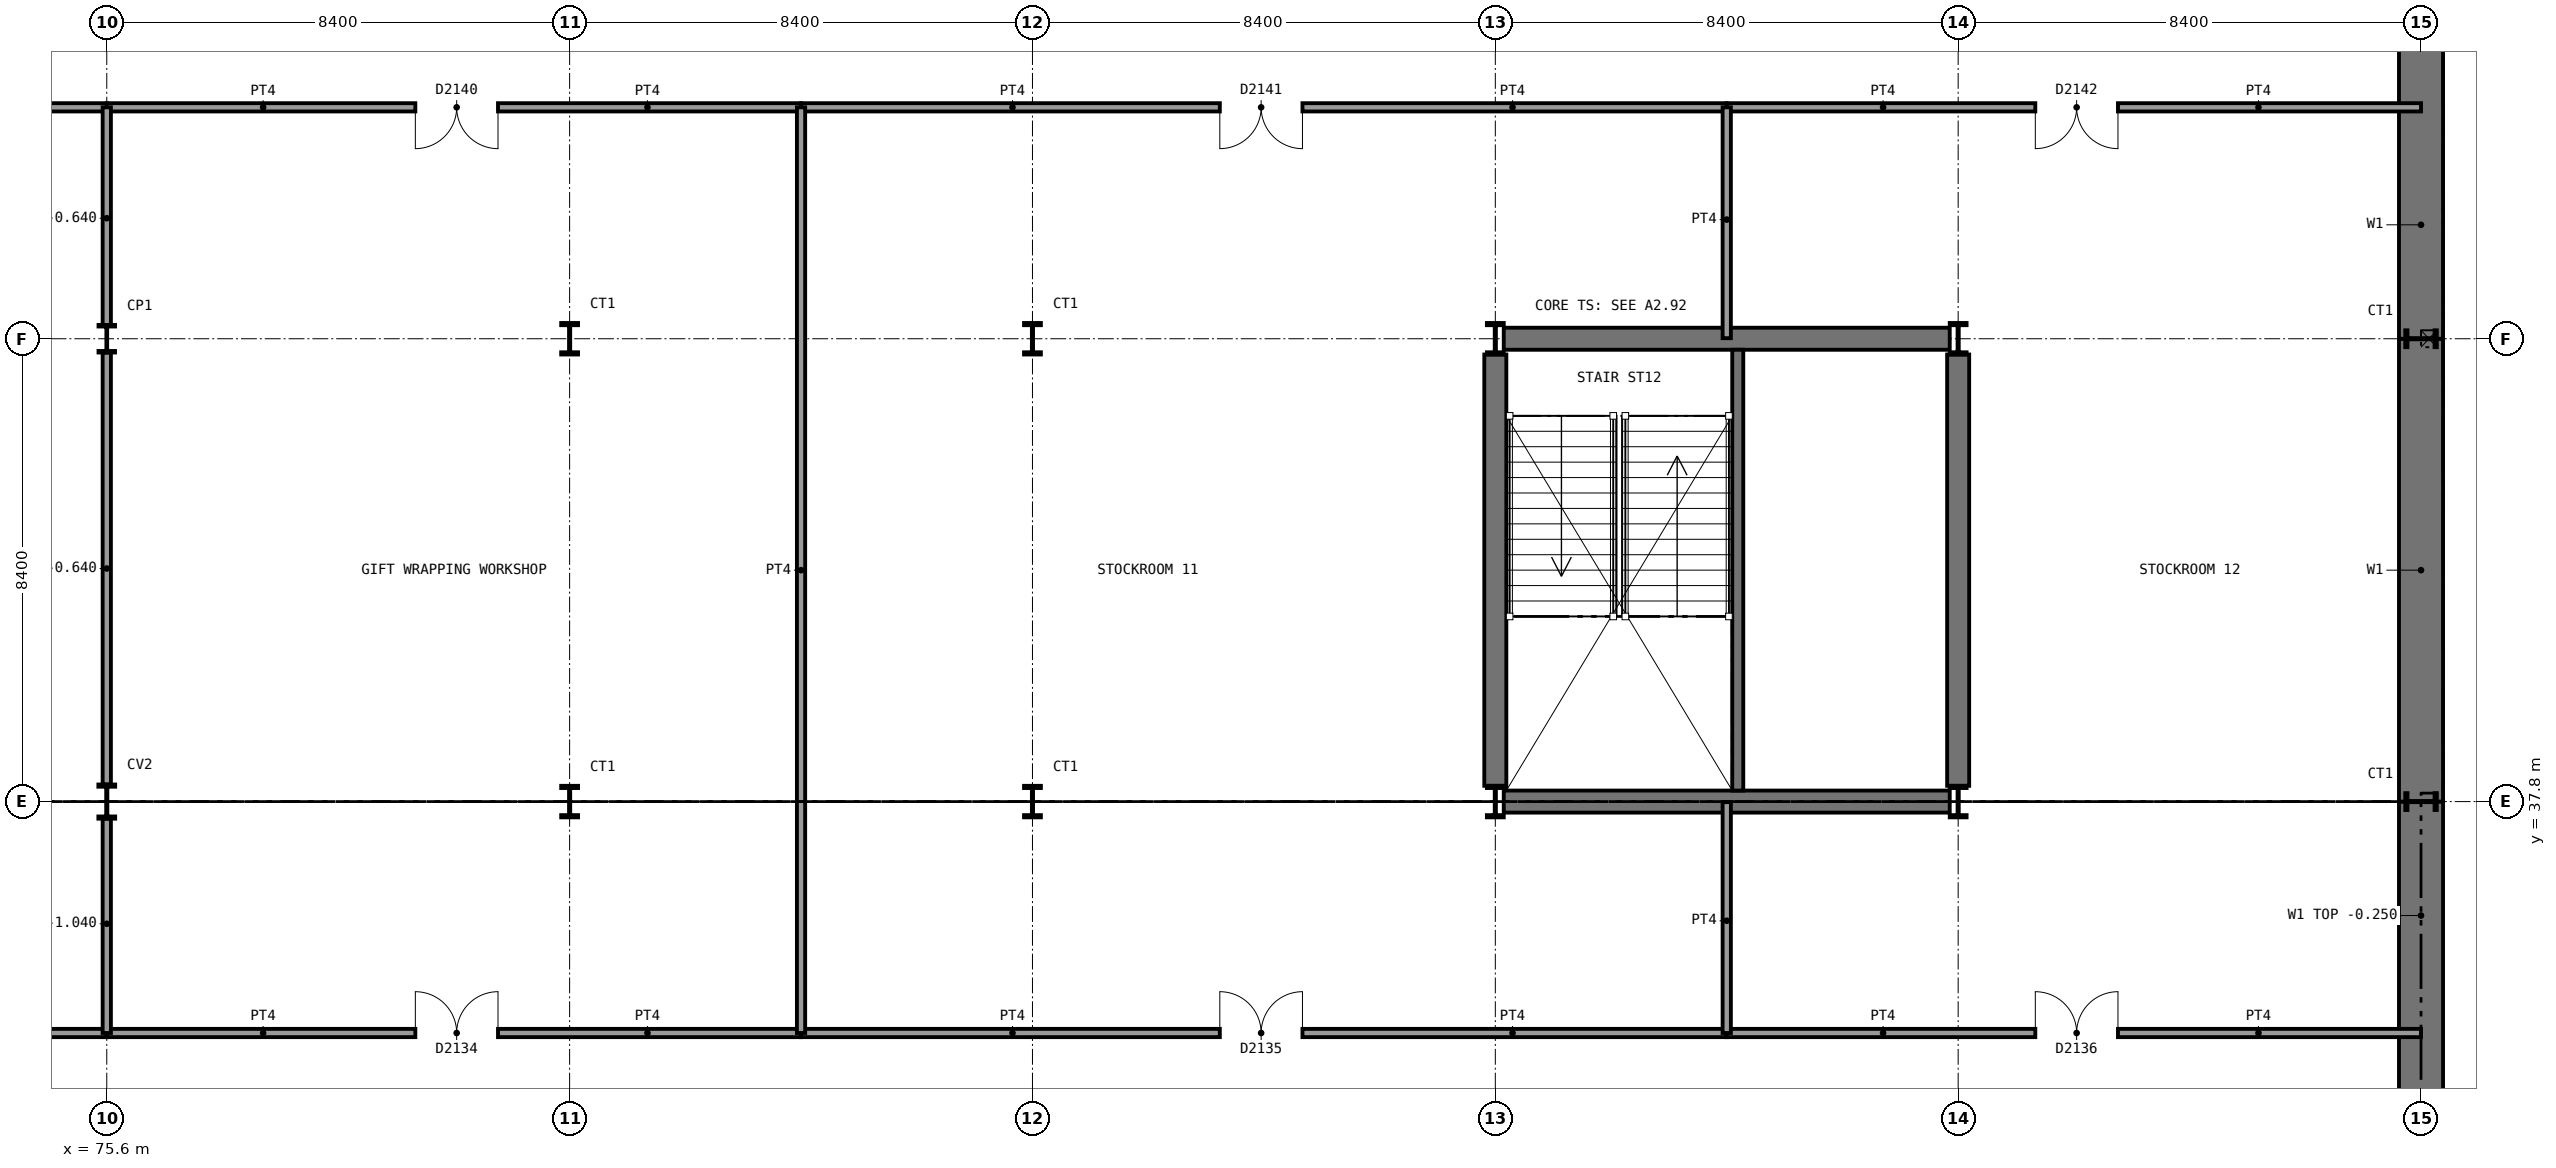
"""IFC4 building model, lengths in metres.
Left out: names, types, materials, properties, quantities, classifications, styles, units other than length and angle.
Written with IfcOpenShell. Run it as: python <this file> out.ifc"""

import sys

from ifc_helpers import new_model, si_unit, direction, frame, frame_2d, origin, origin_2d, place, context, subcontext, project, spatial, rectangle, i_section, extrude, element, fill, save


model = new_model("IFC4")
c1 = context("Model", 3, precision=1e-05, world=origin(), true_north=direction((0.0, 1.0)))
c2 = subcontext(c1, "Body", "Model", "MODEL_VIEW")
j1 = project(units=[si_unit("LENGTHUNIT", "METRE"), si_unit("PLANEANGLEUNIT", "RADIAN")], contexts=[c1])
p1 = place(None, origin())
s1 = spatial("IfcSite", under=j1, at=p1, CompositionType="ELEMENT")
p2 = place(p1, origin())
s2 = spatial("IfcBuilding", under=s1, at=p2, CompositionType="ELEMENT")
p3 = place(p2, frame((0.0, 0.0, -4.9)))
s3 = spatial("IfcBuildingStorey", under=s2, at=p3, CompositionType="ELEMENT", Elevation=-4.9)
p4 = place(p3, frame((117.6, 25.2, 0.0), z_axis=(0.0, 0.0, 1.0), x_axis=(0.0, 1.0, 0.0)))
e1 = element("IfcWall", 1, at=p4, inside=s3, PredefinedType="SOLIDWALL", context=c2, shape_type="SweptSolid", body=[
    extrude(rectangle(XDim=12.6, YDim=0.8, at=frame_2d((6.3, 0.0))), origin(), (0.0, 0.0, 1.0), 4.65),
])
p5 = place(p3, frame((117.6, 37.8, 0.0), z_axis=(0.0, 0.0, 1.0), x_axis=(0.0, 1.0, 0.0)))
e2 = element("IfcWall", 2, at=p5, inside=s3, PredefinedType="SOLIDWALL", context=c2, shape_type="SweptSolid", body=[
    extrude(rectangle(XDim=8.4, YDim=0.8, at=frame_2d((4.2, 0.0))), origin(), (0.0, 0.0, 1.0), 4.75),
])
p6 = place(p3, frame((117.6, 46.2, 0.0), z_axis=(0.0, 0.0, 1.0), x_axis=(0.0, 1.0, 0.0)))
e3 = element("IfcWall", 3, at=p6, inside=s3, PredefinedType="SOLIDWALL", context=c2, shape_type="SweptSolid", body=[
    extrude(rectangle(XDim=8.247, YDim=0.8, at=frame_2d((4.124, 0.0))), origin(), (0.0, 0.0, 1.0), 4.75),
])
for number, where, z_axis, x_axis in (
    (4, (100.953, 37.8, 0.0), (0.0, 0.0, 1.0), (1.0, 0.0, 0.0)),
    (5, (100.953, 46.2, 0.0), (0.0, 0.0, 1.0), (1.0, 0.0, 0.0)),
):
    element("IfcWall", number, at=place(p3, frame(where, z_axis=z_axis, x_axis=x_axis)), inside=s3, PredefinedType="SHEAR", context=c2, shape_type="SweptSolid", body=[
        extrude(rectangle(XDim=8.094, YDim=0.4, at=frame_2d((4.047, 0.0))), origin(), (0.0, 0.0, 1.0), 4.75),
    ])
for number, where, z_axis, x_axis in (
    (6, (100.8, 38.086, 0.0), (0.0, 0.0, 1.0), (0.0, 1.0, 0.0)),
    (7, (109.2, 38.086, 0.0), (0.0, 0.0, 1.0), (0.0, 1.0, 0.0)),
):
    element("IfcWall", number, at=place(p3, frame(where, z_axis=z_axis, x_axis=x_axis)), inside=s3, PredefinedType="SHEAR", context=c2, shape_type="SweptSolid", body=[
        extrude(rectangle(XDim=7.828, YDim=0.4, at=frame_2d((3.914, 0.0))), origin(), (0.0, 0.0, 1.0), 4.75),
    ])
p7 = place(p3, frame((75.6, 37.8, 0.0), z_axis=(0.0, 0.0, 1.0), x_axis=(1.0, 0.0, 0.0)))
e8 = element("IfcColumn", 8, at=p7, inside=s3, PredefinedType="COLUMN", context=c2, shape_type="SweptSolid", body=[
    extrude(i_section(OverallWidth=0.305, OverallDepth=0.62, WebThickness=0.021, FlangeThickness=0.04, FilletRadius=0.027, at=origin_2d()), origin(), (0.0, 0.0, 1.0), 4.9),
])
p8 = place(p3, frame((75.6, 46.2, 0.0), z_axis=(0.0, 0.0, 1.0), x_axis=(1.0, 0.0, 0.0)))
e9 = element("IfcColumn", 9, at=p8, inside=s3, PredefinedType="COLUMN", context=c2, shape_type="SweptSolid", body=[
    extrude(i_section(OverallWidth=0.3, OverallDepth=0.5, WebThickness=0.014, FlangeThickness=0.028, FilletRadius=0.027, at=origin_2d()), origin(), (0.0, 0.0, 1.0), 4.9),
])
for number, where, z_axis, x_axis in (
    (10, (84.0, 37.8, 0.0), (0.0, 0.0, 1.0), (1.0, 0.0, 0.0)),
    (11, (84.0, 46.2, 0.0), (0.0, 0.0, 1.0), (1.0, 0.0, 0.0)),
    (12, (92.4, 37.8, 0.0), (0.0, 0.0, 1.0), (1.0, 0.0, 0.0)),
    (13, (92.4, 46.2, 0.0), (0.0, 0.0, 1.0), (1.0, 0.0, 0.0)),
    (14, (100.8, 37.8, 0.0), (0.0, 0.0, 1.0), (1.0, 0.0, 0.0)),
    (15, (100.8, 46.2, 0.0), (0.0, 0.0, 1.0), (1.0, 0.0, 0.0)),
    (16, (109.2, 37.8, 0.0), (0.0, 0.0, 1.0), (1.0, 0.0, 0.0)),
    (17, (109.2, 46.2, 0.0), (0.0, 0.0, 1.0), (1.0, 0.0, 0.0)),
    (18, (117.6, 37.8, 0.0), (0.0, 0.0, 1.0), (0.0, 1.0, 0.0)),
    (19, (117.6, 46.2, 0.0), (0.0, 0.0, 1.0), (0.0, 1.0, 0.0)),
):
    element("IfcColumn", number, at=place(p3, frame(where, z_axis=z_axis, x_axis=x_axis)), inside=s3, PredefinedType="COLUMN", context=c2, shape_type="SweptSolid", body=[
        extrude(i_section(OverallWidth=0.306, OverallDepth=0.572, WebThickness=0.021, FlangeThickness=0.04, FilletRadius=0.027, at=origin_2d()), origin(), (0.0, 0.0, 1.0), 4.9),
    ])
p9 = place(p3, frame((58.8, 33.6, 0.0), z_axis=(0.0, 0.0, 1.0), x_axis=(1.0, 0.0, 0.0)))
e20 = element("IfcWall", 20, at=p9, inside=s3, PredefinedType="SOLIDWALL", context=c2, shape_type="SweptSolid", body=[
    extrude(rectangle(XDim=16.8, YDim=0.15, at=frame_2d((8.4, 0.0))), origin(), (0.0, 0.0, 1.0), 4.65),
])
p10 = place(p9, frame((7.6, 0.0, 0.0)))
e21 = element("IfcOpeningElement", 21, at=p10, cuts=e20, PredefinedType="OPENING", context=c2, shape_type="SweptSolid", body=[
    extrude(rectangle(XDim=1.5, YDim=2.1, at=frame_2d((0.75, 1.05))), frame((0.0, 0.085, 0.0), z_axis=(0.0, -1.0, 0.0), x_axis=(1.0, 0.0, 0.0)), (0.0, 0.0, 1.0), 0.17),
])
p11 = place(p3, frame((75.6, 33.6, 0.0), z_axis=(0.0, 0.0, 1.0), x_axis=(1.0, 0.0, 0.0)))
e22 = element("IfcWall", 22, at=p11, inside=s3, PredefinedType="SOLIDWALL", context=c2, shape_type="SweptSolid", body=[
    extrude(rectangle(XDim=12.6, YDim=0.15, at=frame_2d((6.3, 0.0))), origin(), (0.0, 0.0, 1.0), 4.65),
])
p12 = place(p11, frame((5.6, 0.0, 0.0)))
e23 = element("IfcOpeningElement", 23, at=p12, cuts=e22, PredefinedType="OPENING", context=c2, shape_type="SweptSolid", body=[
    extrude(rectangle(XDim=1.5, YDim=2.1, at=frame_2d((0.75, 1.05))), frame((0.0, 0.085, 0.0), z_axis=(0.0, -1.0, 0.0), x_axis=(1.0, 0.0, 0.0)), (0.0, 0.0, 1.0), 0.17),
])
p13 = place(p3, frame((88.2, 33.6, 0.0), z_axis=(0.0, 0.0, 1.0), x_axis=(1.0, 0.0, 0.0)))
e24 = element("IfcWall", 24, at=p13, inside=s3, PredefinedType="SOLIDWALL", context=c2, shape_type="SweptSolid", body=[
    extrude(rectangle(XDim=16.8, YDim=0.15, at=frame_2d((8.4, 0.0))), origin(), (0.0, 0.0, 1.0), 4.65),
])
p14 = place(p13, frame((7.6, 0.0, 0.0)))
e25 = element("IfcOpeningElement", 25, at=p14, cuts=e24, PredefinedType="OPENING", context=c2, shape_type="SweptSolid", body=[
    extrude(rectangle(XDim=1.5, YDim=2.1, at=frame_2d((0.75, 1.05))), frame((0.0, 0.085, 0.0), z_axis=(0.0, -1.0, 0.0), x_axis=(1.0, 0.0, 0.0)), (0.0, 0.0, 1.0), 0.17),
])
p15 = place(p3, frame((105.0, 33.6, 0.0), z_axis=(0.0, 0.0, 1.0), x_axis=(1.0, 0.0, 0.0)))
e26 = element("IfcWall", 26, at=p15, inside=s3, PredefinedType="SOLIDWALL", context=c2, shape_type="SweptSolid", body=[
    extrude(rectangle(XDim=12.6, YDim=0.15, at=frame_2d((6.3, 0.0))), origin(), (0.0, 0.0, 1.0), 4.65),
])
p16 = place(p15, frame((5.6, 0.0, 0.0)))
e27 = element("IfcOpeningElement", 27, at=p16, cuts=e26, PredefinedType="OPENING", context=c2, shape_type="SweptSolid", body=[
    extrude(rectangle(XDim=1.5, YDim=2.1, at=frame_2d((0.75, 1.05))), frame((0.0, 0.085, 0.0), z_axis=(0.0, -1.0, 0.0), x_axis=(1.0, 0.0, 0.0)), (0.0, 0.0, 1.0), 0.17),
])
p17 = place(p3, frame((58.8, 50.4, 0.0), z_axis=(0.0, 0.0, 1.0), x_axis=(1.0, 0.0, 0.0)))
e28 = element("IfcWall", 28, at=p17, inside=s3, PredefinedType="SOLIDWALL", context=c2, shape_type="SweptSolid", body=[
    extrude(rectangle(XDim=16.8, YDim=0.15, at=frame_2d((8.4, 0.0))), origin(), (0.0, 0.0, 1.0), 4.65),
])
p18 = place(p17, frame((7.6, 0.0, 0.0)))
e29 = element("IfcOpeningElement", 29, at=p18, cuts=e28, PredefinedType="OPENING", context=c2, shape_type="SweptSolid", body=[
    extrude(rectangle(XDim=1.5, YDim=2.1, at=frame_2d((0.75, 1.05))), frame((0.0, 0.085, 0.0), z_axis=(0.0, -1.0, 0.0), x_axis=(1.0, 0.0, 0.0)), (0.0, 0.0, 1.0), 0.17),
])
p19 = place(p3, frame((75.6, 50.4, 0.0), z_axis=(0.0, 0.0, 1.0), x_axis=(1.0, 0.0, 0.0)))
e30 = element("IfcWall", 30, at=p19, inside=s3, PredefinedType="SOLIDWALL", context=c2, shape_type="SweptSolid", body=[
    extrude(rectangle(XDim=12.6, YDim=0.15, at=frame_2d((6.3, 0.0))), origin(), (0.0, 0.0, 1.0), 4.65),
])
p20 = place(p19, frame((5.6, 0.0, 0.0)))
e31 = element("IfcOpeningElement", 31, at=p20, cuts=e30, PredefinedType="OPENING", context=c2, shape_type="SweptSolid", body=[
    extrude(rectangle(XDim=1.5, YDim=2.1, at=frame_2d((0.75, 1.05))), frame((0.0, 0.085, 0.0), z_axis=(0.0, -1.0, 0.0), x_axis=(1.0, 0.0, 0.0)), (0.0, 0.0, 1.0), 0.17),
])
p21 = place(p3, frame((88.2, 50.4, 0.0), z_axis=(0.0, 0.0, 1.0), x_axis=(1.0, 0.0, 0.0)))
e32 = element("IfcWall", 32, at=p21, inside=s3, PredefinedType="SOLIDWALL", context=c2, shape_type="SweptSolid", body=[
    extrude(rectangle(XDim=16.8, YDim=0.15, at=frame_2d((8.4, 0.0))), origin(), (0.0, 0.0, 1.0), 4.65),
])
p22 = place(p21, frame((7.6, 0.0, 0.0)))
e33 = element("IfcOpeningElement", 33, at=p22, cuts=e32, PredefinedType="OPENING", context=c2, shape_type="SweptSolid", body=[
    extrude(rectangle(XDim=1.5, YDim=2.1, at=frame_2d((0.75, 1.05))), frame((0.0, 0.085, 0.0), z_axis=(0.0, -1.0, 0.0), x_axis=(1.0, 0.0, 0.0)), (0.0, 0.0, 1.0), 0.17),
])
p23 = place(p3, frame((105.0, 50.4, 0.0), z_axis=(0.0, 0.0, 1.0), x_axis=(1.0, 0.0, 0.0)))
e34 = element("IfcWall", 34, at=p23, inside=s3, PredefinedType="SOLIDWALL", context=c2, shape_type="SweptSolid", body=[
    extrude(rectangle(XDim=12.6, YDim=0.15, at=frame_2d((6.3, 0.0))), origin(), (0.0, 0.0, 1.0), 4.65),
])
p24 = place(p23, frame((5.6, 0.0, 0.0)))
e35 = element("IfcOpeningElement", 35, at=p24, cuts=e34, PredefinedType="OPENING", context=c2, shape_type="SweptSolid", body=[
    extrude(rectangle(XDim=1.5, YDim=2.1, at=frame_2d((0.75, 1.05))), frame((0.0, 0.085, 0.0), z_axis=(0.0, -1.0, 0.0), x_axis=(1.0, 0.0, 0.0)), (0.0, 0.0, 1.0), 0.17),
])
p25 = place(p3, frame((75.6, 33.6, 0.0), z_axis=(0.0, 0.0, 1.0), x_axis=(0.0, 1.0, 0.0)))
e36 = element("IfcWall", 36, at=p25, inside=s3, PredefinedType="SOLIDWALL", context=c2, shape_type="SweptSolid", body=[
    extrude(rectangle(XDim=3.89, YDim=0.15, at=frame_2d((1.945, 0.0))), origin(), (0.0, 0.0, 1.0), 3.86),
])
p26 = place(p3, frame((75.6, 38.11, 0.0), z_axis=(0.0, 0.0, 1.0), x_axis=(0.0, 1.0, 0.0)))
e37 = element("IfcWall", 37, at=p26, inside=s3, PredefinedType="SOLIDWALL", context=c2, shape_type="SweptSolid", body=[
    extrude(rectangle(XDim=7.84, YDim=0.15, at=frame_2d((3.92, 0.0))), origin(), (0.0, 0.0, 1.0), 4.26),
])
p27 = place(p3, frame((75.6, 46.45, 0.0), z_axis=(0.0, 0.0, 1.0), x_axis=(0.0, 1.0, 0.0)))
e38 = element("IfcWall", 38, at=p27, inside=s3, PredefinedType="SOLIDWALL", context=c2, shape_type="SweptSolid", body=[
    extrude(rectangle(XDim=3.95, YDim=0.15, at=frame_2d((1.975, 0.0))), origin(), (0.0, 0.0, 1.0), 4.26),
])
p28 = place(p3, frame((88.2, 33.6, 0.0), z_axis=(0.0, 0.0, 1.0), x_axis=(0.0, 1.0, 0.0)))
e39 = element("IfcWall", 39, at=p28, inside=s3, PredefinedType="SOLIDWALL", context=c2, shape_type="SweptSolid", body=[
    extrude(rectangle(XDim=16.8, YDim=0.15, at=frame_2d((8.4, 0.0))), origin(), (0.0, 0.0, 1.0), 4.65),
])
for number, where, z_axis, x_axis in (
    (40, (105.0, 33.6, 0.0), (0.0, 0.0, 1.0), (0.0, 1.0, 0.0)),
    (41, (105.0, 46.21, 0.0), (0.0, 0.0, 1.0), (0.0, 1.0, 0.0)),
):
    element("IfcWall", number, at=place(p3, frame(where, z_axis=z_axis, x_axis=x_axis)), inside=s3, PredefinedType="SOLIDWALL", context=c2, shape_type="SweptSolid", body=[
        extrude(rectangle(XDim=4.19, YDim=0.15, at=frame_2d((2.095, 0.0))), origin(), (0.0, 0.0, 1.0), 4.65),
    ])
p29 = place(p3, frame((105.2, 38.0, 0.0), z_axis=(0.0, 0.0, 1.0), x_axis=(0.0, 1.0, 0.0)))
e42 = element("IfcWall", 42, at=p29, inside=s3, PredefinedType="SHEAR", context=c2, shape_type="SweptSolid", body=[
    extrude(rectangle(XDim=8.0, YDim=0.2, at=frame_2d((4.0, 0.0))), origin(), (0.0, 0.0, 1.0), 4.75),
])
p30 = place(p12, origin())
e43 = element("IfcDoor", 43, at=p30, inside=s3, OperationType="DOUBLE_DOOR_SINGLE_SWING", PredefinedType="DOOR", context=c2, shape_type="SweptSolid", body=[
    extrude(rectangle(XDim=1.5, YDim=2.1, at=frame_2d((0.75, 1.05))), frame((0.0, 0.025, 0.0), z_axis=(0.0, -1.0, 0.0), x_axis=(1.0, 0.0, 0.0)), (0.0, 0.0, 1.0), 0.05),
])
fill(e23, e43)
p31 = place(p14, origin())
e44 = element("IfcDoor", 44, at=p31, inside=s3, OperationType="DOUBLE_DOOR_SINGLE_SWING", PredefinedType="DOOR", context=c2, shape_type="SweptSolid", body=[
    extrude(rectangle(XDim=1.5, YDim=2.1, at=frame_2d((0.75, 1.05))), frame((0.0, 0.025, 0.0), z_axis=(0.0, -1.0, 0.0), x_axis=(1.0, 0.0, 0.0)), (0.0, 0.0, 1.0), 0.05),
])
fill(e25, e44)
p32 = place(p16, origin())
e45 = element("IfcDoor", 45, at=p32, inside=s3, OperationType="DOUBLE_DOOR_SINGLE_SWING", PredefinedType="DOOR", context=c2, shape_type="SweptSolid", body=[
    extrude(rectangle(XDim=1.5, YDim=2.1, at=frame_2d((0.75, 1.05))), frame((0.0, 0.025, 0.0), z_axis=(0.0, -1.0, 0.0), x_axis=(1.0, 0.0, 0.0)), (0.0, 0.0, 1.0), 0.05),
])
fill(e27, e45)
p33 = place(p20, frame((1.5, 0.0, 0.0), z_axis=(0.0, 0.0, 1.0), x_axis=(-1.0, 0.0, 0.0)))
e46 = element("IfcDoor", 46, at=p33, inside=s3, OperationType="DOUBLE_DOOR_SINGLE_SWING", PredefinedType="DOOR", context=c2, shape_type="SweptSolid", body=[
    extrude(rectangle(XDim=1.5, YDim=2.1, at=frame_2d((0.75, 1.05))), frame((0.0, 0.025, 0.0), z_axis=(0.0, -1.0, 0.0), x_axis=(1.0, 0.0, 0.0)), (0.0, 0.0, 1.0), 0.05),
])
fill(e31, e46)
p34 = place(p22, frame((1.5, 0.0, 0.0), z_axis=(0.0, 0.0, 1.0), x_axis=(-1.0, 0.0, 0.0)))
e47 = element("IfcDoor", 47, at=p34, inside=s3, OperationType="DOUBLE_DOOR_SINGLE_SWING", PredefinedType="DOOR", context=c2, shape_type="SweptSolid", body=[
    extrude(rectangle(XDim=1.5, YDim=2.1, at=frame_2d((0.75, 1.05))), frame((0.0, 0.025, 0.0), z_axis=(0.0, -1.0, 0.0), x_axis=(1.0, 0.0, 0.0)), (0.0, 0.0, 1.0), 0.05),
])
fill(e33, e47)
p35 = place(p24, frame((1.5, 0.0, 0.0), z_axis=(0.0, 0.0, 1.0), x_axis=(-1.0, 0.0, 0.0)))
e48 = element("IfcDoor", 48, at=p35, inside=s3, OperationType="DOUBLE_DOOR_SINGLE_SWING", PredefinedType="DOOR", context=c2, shape_type="SweptSolid", body=[
    extrude(rectangle(XDim=1.5, YDim=2.1, at=frame_2d((0.75, 1.05))), frame((0.0, 0.025, 0.0), z_axis=(0.0, -1.0, 0.0), x_axis=(1.0, 0.0, 0.0)), (0.0, 0.0, 1.0), 0.05),
])
fill(e35, e48)
save(model, sys.argv[1])
